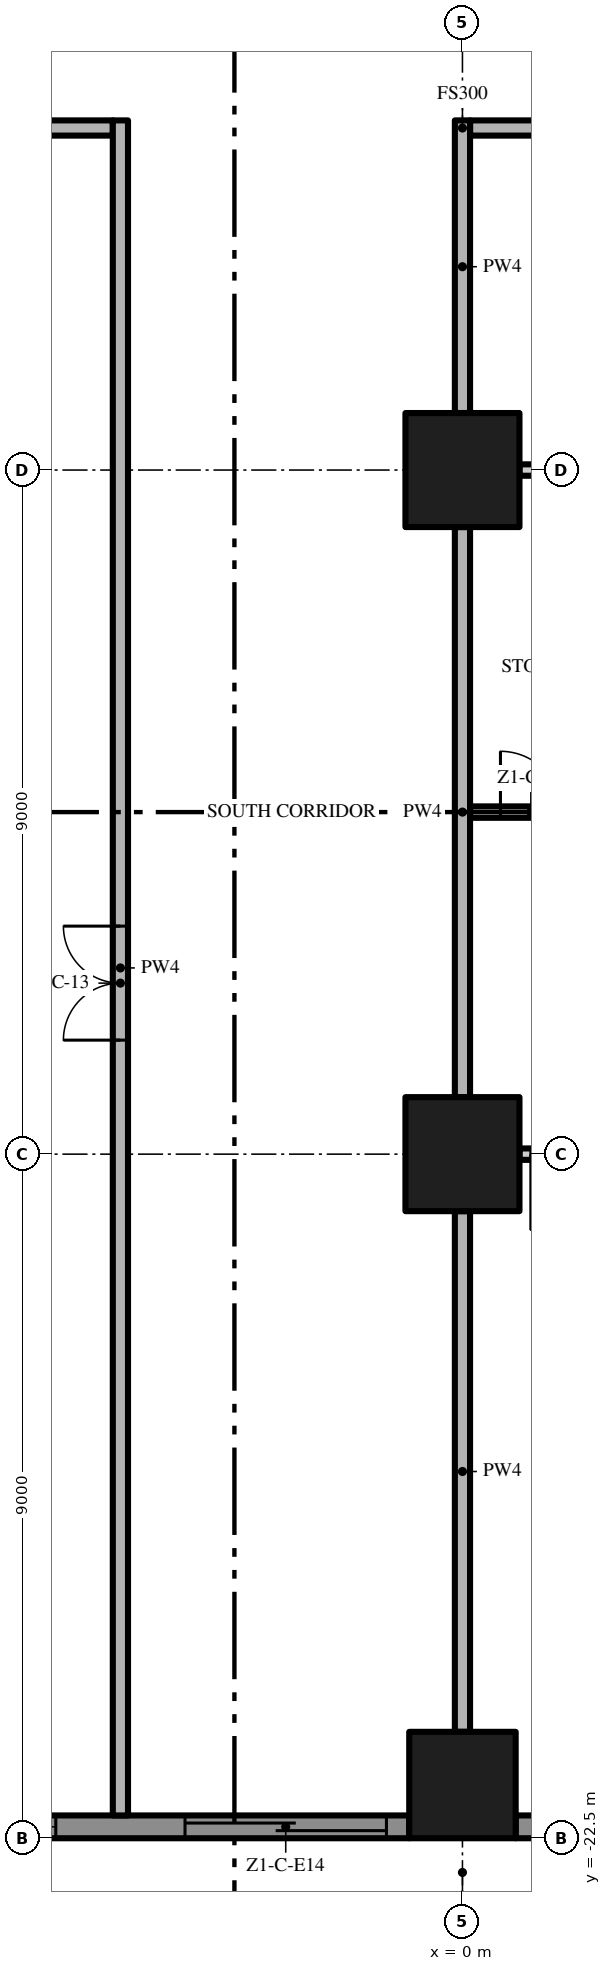
"""IFC4 building model, lengths in metres.
Left out: names, types, materials, properties, quantities, classifications, styles, units other than length and angle.
Written with IfcOpenShell. Run it as: python <this file> out.ifc"""

import sys

from ifc_helpers import new_model, si_unit, direction, frame, frame_2d, origin, origin_2d, place, context, subcontext, project, spatial, polyline, rectangle, outline, extrude, element, fill, save


model = new_model("IFC4")
c1 = context("Model", 3, precision=1e-05, world=origin(), true_north=direction((0.0, 1.0)))
c2 = subcontext(c1, "Body", "Model", "MODEL_VIEW")
j1 = project(units=[si_unit("LENGTHUNIT", "METRE"), si_unit("PLANEANGLEUNIT", "RADIAN")], contexts=[c1])
p1 = place(None, origin())
s1 = spatial("IfcSite", under=j1, at=p1, CompositionType="ELEMENT")
p2 = place(p1, origin())
s2 = spatial("IfcBuilding", under=s1, at=p2, CompositionType="ELEMENT")
p3 = place(p2, frame((0.0, 0.0, 41.6)))
s3 = spatial("IfcBuildingStorey", under=s2, at=p3, CompositionType="ELEMENT", Elevation=41.6)
p4 = place(p3, frame((0.0, -13.5, 0.0), z_axis=(0.0, 0.0, 1.0), x_axis=(1.0, 0.0, 0.0)))
e1 = element("IfcColumn", 1, at=p4, inside=s3, PredefinedType="COLUMN", context=c2, shape_type="SweptSolid", body=[
    extrude(rectangle(XDim=1.5, YDim=1.5, at=origin_2d()), origin(), (0.0, 0.0, 1.0), 3.5),
])
p5 = place(p3, frame((0.0, -21.8, 0.0), z_axis=(0.0, 0.0, 1.0), x_axis=(1.0, 0.0, 0.0)))
e2 = element("IfcColumn", 2, at=p5, inside=s3, PredefinedType="COLUMN", context=c2, shape_type="SweptSolid", body=[
    extrude(rectangle(XDim=1.4, YDim=1.4, at=origin_2d()), origin(), (0.0, 0.0, 1.0), 3.5),
])
p6 = place(p3, frame((0.0, -4.5, 0.0), z_axis=(0.0, 0.0, 1.0), x_axis=(1.0, 0.0, 0.0)))
e3 = element("IfcColumn", 3, at=p6, inside=s3, PredefinedType="COLUMN", context=c2, shape_type="SweptSolid", body=[
    extrude(rectangle(XDim=1.5, YDim=1.5, at=origin_2d()), origin(), (0.0, 0.0, 1.0), 3.5),
])
p7 = place(p3, frame((-0.7, -22.35, 0.0), z_axis=(0.0, 0.0, 1.0), x_axis=(-1.0, 0.0, 0.0)))
e4 = element("IfcWall", 4, at=p7, inside=s3, PredefinedType="SOLIDWALL", context=c2, shape_type="SweptSolid", body=[
    extrude(rectangle(XDim=7.6, YDim=0.3, at=frame_2d((3.8, 0.0))), origin(), (0.0, 0.0, 1.0), 3.5),
])
p8 = place(p7, frame((4.65, 0.0, 0.45)))
e5 = element("IfcOpeningElement", 5, at=p8, cuts=e4, PredefinedType="OPENING", context=c2, shape_type="SweptSolid", body=[
    extrude(rectangle(XDim=2.65, YDim=2.65, at=frame_2d((1.325, 1.325))), frame((0.0, 0.16, 0.0), z_axis=(0.0, -1.0, 0.0), x_axis=(1.0, 0.0, 0.0)), (0.0, 0.0, 1.0), 0.32),
])
p9 = place(p7, frame((0.3, 0.0, 0.0)))
e6 = element("IfcOpeningElement", 6, at=p9, cuts=e4, PredefinedType="OPENING", context=c2, shape_type="SweptSolid", body=[
    extrude(rectangle(XDim=2.65, YDim=2.4, at=frame_2d((1.325, 1.2))), frame((0.0, 0.16, 0.0), z_axis=(0.0, -1.0, 0.0), x_axis=(1.0, 0.0, 0.0)), (0.0, 0.0, 1.0), 0.32),
])
p10 = place(p3, frame((8.3, -22.35, 0.0), z_axis=(0.0, 0.0, 1.0), x_axis=(-1.0, 0.0, 0.0)))
e7 = element("IfcWall", 7, at=p10, inside=s3, PredefinedType="SOLIDWALL", context=c2, shape_type="SweptSolid", body=[
    extrude(rectangle(XDim=7.6, YDim=0.3, at=frame_2d((3.8, 0.0))), origin(), (0.0, 0.0, 1.0), 3.5),
])
p11 = place(p10, frame((4.65, 0.0, 0.45)))
e8 = element("IfcOpeningElement", 8, at=p11, cuts=e7, PredefinedType="OPENING", context=c2, shape_type="SweptSolid", body=[
    extrude(rectangle(XDim=2.65, YDim=2.65, at=frame_2d((1.325, 1.325))), frame((0.0, 0.16, 0.0), z_axis=(0.0, -1.0, 0.0), x_axis=(1.0, 0.0, 0.0)), (0.0, 0.0, 1.0), 0.32),
])
p12 = place(p10, frame((0.3, 0.0, 0.45)))
e9 = element("IfcOpeningElement", 9, at=p12, cuts=e7, PredefinedType="OPENING", context=c2, shape_type="SweptSolid", body=[
    extrude(rectangle(XDim=2.65, YDim=2.65, at=frame_2d((1.325, 1.325))), frame((0.0, 0.16, 0.0), z_axis=(0.0, -1.0, 0.0), x_axis=(1.0, 0.0, 0.0)), (0.0, 0.0, 1.0), 0.32),
])
p13 = place(p3, origin())
e10 = element("IfcWall", 10, at=p13, inside=s3, PredefinedType="USERDEFINED", context=c2, shape_type="SweptSolid", body=[
    extrude(outline(polyline([(-22.5, -23.451), (-21.0, -24.112), (-19.5, -24.845), (-18.0, -25.369), (-16.875, -25.5), (-16.5, -25.485), (-15.0, -25.149), (-13.5, -24.488), (-12.0, -23.755), (-10.5, -23.231), (-9.375, -23.1), (-9.0, -23.115), (-7.5, -23.451), (-6.0, -24.112), (-4.5, -24.845), (-3.0, -25.369), (-1.875, -25.5), (-1.5, -25.485), (0.0, -25.149), (1.5, -24.488), (3.0, -23.755), (4.5, -23.231), (5.625, -23.1), (6.0, -23.115), (7.5, -23.451), (9.0, -24.112), (10.5, -24.845), (12.0, -25.369), (13.125, -25.5), (13.5, -25.485), (15.0, -25.149), (16.5, -24.488), (18.0, -23.755), (19.5, -23.231), (20.625, -23.1), (21.0, -23.115), (22.5, -23.451), (22.555, -23.208), (21.033, -22.866), (20.615, -22.849), (19.444, -22.986), (17.904, -23.524), (16.395, -24.261), (14.921, -24.91), (13.467, -25.236), (13.135, -25.249), (12.056, -25.124), (10.596, -24.614), (9.105, -23.885), (7.579, -23.213), (6.033, -22.866), (5.615, -22.849), (4.444, -22.986), (2.904, -23.524), (1.395, -24.261), (-0.079, -24.91), (-1.533, -25.236), (-1.865, -25.249), (-2.944, -25.124), (-4.404, -24.614), (-5.895, -23.885), (-7.421, -23.213), (-8.967, -22.866), (-9.385, -22.849), (-10.556, -22.986), (-12.096, -23.524), (-13.605, -24.261), (-15.079, -24.91), (-16.533, -25.236), (-16.865, -25.249), (-17.944, -25.124), (-19.404, -24.614), (-20.895, -23.885), (-22.399, -23.223), (-22.5, -23.451)])), origin(), (0.0, 0.0, 1.0), 0.9),
])
p14 = place(p3, frame((8.25, -13.5, 0.0), z_axis=(0.0, 0.0, 1.0), x_axis=(-1.0, 0.0, 0.0)))
e11 = element("IfcWall", 11, at=p14, inside=s3, PredefinedType="PARTITIONING", context=c2, shape_type="SweptSolid", body=[
    extrude(rectangle(XDim=7.5, YDim=0.15, at=frame_2d((3.75, 0.0))), origin(), (0.0, 0.0, 1.0), 3.5),
])
p15 = place(p14, frame((6.35, 0.0, 0.0)))
e12 = element("IfcOpeningElement", 12, at=p15, cuts=e11, PredefinedType="OPENING", context=c2, shape_type="SweptSolid", body=[
    extrude(rectangle(XDim=1.0, YDim=2.4, at=frame_2d((0.5, 1.2))), frame((0.0, 0.085, 0.0), z_axis=(0.0, -1.0, 0.0), x_axis=(1.0, 0.0, 0.0)), (0.0, 0.0, 1.0), 0.17),
])
p16 = place(p14, frame((0.15, 0.0, 0.0)))
e13 = element("IfcOpeningElement", 13, at=p16, cuts=e11, PredefinedType="OPENING", context=c2, shape_type="SweptSolid", body=[
    extrude(rectangle(XDim=1.0, YDim=2.4, at=frame_2d((0.5, 1.2))), frame((0.0, 0.085, 0.0), z_axis=(0.0, -1.0, 0.0), x_axis=(1.0, 0.0, 0.0)), (0.0, 0.0, 1.0), 0.17),
])
p17 = place(p3, frame((0.1, -9.0, 0.0), z_axis=(0.0, 0.0, 1.0), x_axis=(1.0, 0.0, 0.0)))
e14 = element("IfcWall", 14, at=p17, inside=s3, PredefinedType="PARTITIONING", context=c2, shape_type="SweptSolid", body=[
    extrude(rectangle(XDim=13.4, YDim=0.15, at=frame_2d((6.7, 0.0))), origin(), (0.0, 0.0, 1.0), 3.5),
])
p18 = place(p17, frame((0.4, 0.0, 0.0)))
e15 = element("IfcOpeningElement", 15, at=p18, cuts=e14, PredefinedType="OPENING", context=c2, shape_type="SweptSolid", body=[
    extrude(rectangle(XDim=0.8, YDim=2.0, at=frame_2d((0.4, 1.0))), frame((0.0, 0.085, 0.0), z_axis=(0.0, -1.0, 0.0), x_axis=(1.0, 0.0, 0.0)), (0.0, 0.0, 1.0), 0.17),
])
p19 = place(p17, frame((6.9, 0.0, 0.0)))
e16 = element("IfcOpeningElement", 16, at=p19, cuts=e14, PredefinedType="OPENING", context=c2, shape_type="SweptSolid", body=[
    extrude(rectangle(XDim=1.0, YDim=2.4, at=frame_2d((0.5, 1.2))), frame((0.0, 0.085, 0.0), z_axis=(0.0, -1.0, 0.0), x_axis=(1.0, 0.0, 0.0)), (0.0, 0.0, 1.0), 0.17),
])
p20 = place(p3, frame((8.25, -4.5, 0.0), z_axis=(0.0, 0.0, 1.0), x_axis=(-1.0, 0.0, 0.0)))
e17 = element("IfcWall", 17, at=p20, inside=s3, PredefinedType="PARTITIONING", context=c2, shape_type="SweptSolid", body=[
    extrude(rectangle(XDim=7.5, YDim=0.15, at=frame_2d((3.75, 0.0))), origin(), (0.0, 0.0, 1.0), 3.5),
])
p21 = place(p20, frame((4.7, 0.0, 0.0)))
e18 = element("IfcOpeningElement", 18, at=p21, cuts=e17, PredefinedType="OPENING", context=c2, shape_type="SweptSolid", body=[
    extrude(rectangle(XDim=0.8, YDim=2.0, at=frame_2d((0.4, 1.0))), frame((0.0, 0.085, 0.0), z_axis=(0.0, -1.0, 0.0), x_axis=(1.0, 0.0, 0.0)), (0.0, 0.0, 1.0), 0.17),
])
p22 = place(p3, frame((-17.4, 0.0, 0.0), z_axis=(0.0, 0.0, 1.0), x_axis=(1.0, 0.0, 0.0)))
e19 = element("IfcWall", 19, at=p22, inside=s3, PredefinedType="PARTITIONING", context=c2, shape_type="SweptSolid", body=[
    extrude(rectangle(XDim=12.8, YDim=0.2, at=frame_2d((6.4, 0.0))), origin(), (0.0, 0.0, 1.0), 3.5),
])
p23 = place(p3, frame((17.4, 0.0, 0.0), z_axis=(0.0, 0.0, 1.0), x_axis=(-1.0, 0.0, 0.0)))
e20 = element("IfcWall", 20, at=p23, inside=s3, PredefinedType="PARTITIONING", context=c2, shape_type="SweptSolid", body=[
    extrude(rectangle(XDim=17.3, YDim=0.2, at=frame_2d((8.65, 0.0))), origin(), (0.0, 0.0, 1.0), 3.5),
])
p24 = place(p23, frame((7.65, 0.0, 0.0)))
e21 = element("IfcOpeningElement", 21, at=p24, cuts=e20, PredefinedType="OPENING", context=c2, shape_type="SweptSolid", body=[
    extrude(rectangle(XDim=1.5, YDim=2.4, at=frame_2d((0.75, 1.2))), frame((0.0, 0.11, 0.0), z_axis=(0.0, -1.0, 0.0), x_axis=(1.0, 0.0, 0.0)), (0.0, 0.0, 1.0), 0.22),
])
p25 = place(p3, frame((-4.5, -22.2, 0.0), z_axis=(0.0, 0.0, 1.0), x_axis=(0.0, 1.0, 0.0)))
e22 = element("IfcWall", 22, at=p25, inside=s3, PredefinedType="PARTITIONING", context=c2, shape_type="SweptSolid", body=[
    extrude(rectangle(XDim=22.3, YDim=0.2, at=frame_2d((11.15, 0.0))), origin(), (0.0, 0.0, 1.0), 3.5),
])
p26 = place(p25, frame((10.2, 0.0, 0.0)))
e23 = element("IfcOpeningElement", 23, at=p26, cuts=e22, PredefinedType="OPENING", context=c2, shape_type="SweptSolid", body=[
    extrude(rectangle(XDim=1.5, YDim=2.4, at=frame_2d((0.75, 1.2))), frame((0.0, 0.11, 0.0), z_axis=(0.0, -1.0, 0.0), x_axis=(1.0, 0.0, 0.0)), (0.0, 0.0, 1.0), 0.22),
])
p27 = place(p3, frame((0.0, -21.1, 0.0), z_axis=(0.0, 0.0, 1.0), x_axis=(0.0, 1.0, 0.0)))
e24 = element("IfcWall", 24, at=p27, inside=s3, PredefinedType="PARTITIONING", context=c2, shape_type="SweptSolid", body=[
    extrude(rectangle(XDim=6.85, YDim=0.2, at=frame_2d((3.425, 0.0))), origin(), (0.0, 0.0, 1.0), 3.5),
])
p28 = place(p3, frame((0.0, -12.75, 0.0), z_axis=(0.0, 0.0, 1.0), x_axis=(0.0, 1.0, 0.0)))
e25 = element("IfcWall", 25, at=p28, inside=s3, PredefinedType="PARTITIONING", context=c2, shape_type="SweptSolid", body=[
    extrude(rectangle(XDim=7.5, YDim=0.2, at=frame_2d((3.75, 0.0))), origin(), (0.0, 0.0, 1.0), 3.5),
])
p29 = place(p3, frame((0.0, -3.75, 0.0), z_axis=(0.0, 0.0, 1.0), x_axis=(0.0, 1.0, 0.0)))
e26 = element("IfcWall", 26, at=p29, inside=s3, PredefinedType="PARTITIONING", context=c2, shape_type="SweptSolid", body=[
    extrude(rectangle(XDim=3.85, YDim=0.2, at=frame_2d((1.925, 0.0))), origin(), (0.0, 0.0, 1.0), 3.5),
])
p30 = place(p8, origin())
e27 = element("IfcWindow", 27, at=p30, inside=s3, PartitioningType="SINGLE_PANEL", PredefinedType="WINDOW", context=c2, shape_type="SweptSolid", body=[
    extrude(rectangle(XDim=2.65, YDim=2.65, at=frame_2d((1.325, 1.325))), frame((0.0, 0.03, 0.0), z_axis=(0.0, -1.0, 0.0), x_axis=(1.0, 0.0, 0.0)), (0.0, 0.0, 1.0), 0.06),
])
fill(e5, e27)
p31 = place(p9, origin())
e28 = element("IfcDoor", 28, at=p31, inside=s3, OperationType="SINGLE_SWING_LEFT", PredefinedType="DOOR", context=c2, shape_type="SweptSolid", body=[
    extrude(rectangle(XDim=2.65, YDim=2.4, at=frame_2d((1.325, 1.2))), frame((0.0, 0.025, 0.0), z_axis=(0.0, -1.0, 0.0), x_axis=(1.0, 0.0, 0.0)), (0.0, 0.0, 1.0), 0.05),
])
fill(e6, e28)
p32 = place(p26, origin())
e29 = element("IfcDoor", 29, at=p32, inside=s3, OperationType="DOUBLE_DOOR_SINGLE_SWING", PredefinedType="DOOR", context=c2, shape_type="SweptSolid", body=[
    extrude(rectangle(XDim=1.5, YDim=2.4, at=frame_2d((0.75, 1.2))), frame((0.0, 0.025, 0.0), z_axis=(0.0, -1.0, 0.0), x_axis=(1.0, 0.0, 0.0)), (0.0, 0.0, 1.0), 0.05),
])
fill(e23, e29)
p33 = place(p18, origin())
e30 = element("IfcDoor", 30, at=p33, inside=s3, OperationType="SINGLE_SWING_LEFT", PredefinedType="DOOR", context=c2, shape_type="SweptSolid", body=[
    extrude(rectangle(XDim=0.8, YDim=2.0, at=frame_2d((0.4, 1.0))), frame((0.0, 0.025, 0.0), z_axis=(0.0, -1.0, 0.0), x_axis=(1.0, 0.0, 0.0)), (0.0, 0.0, 1.0), 0.05),
])
fill(e15, e30)
save(model, sys.argv[1])
